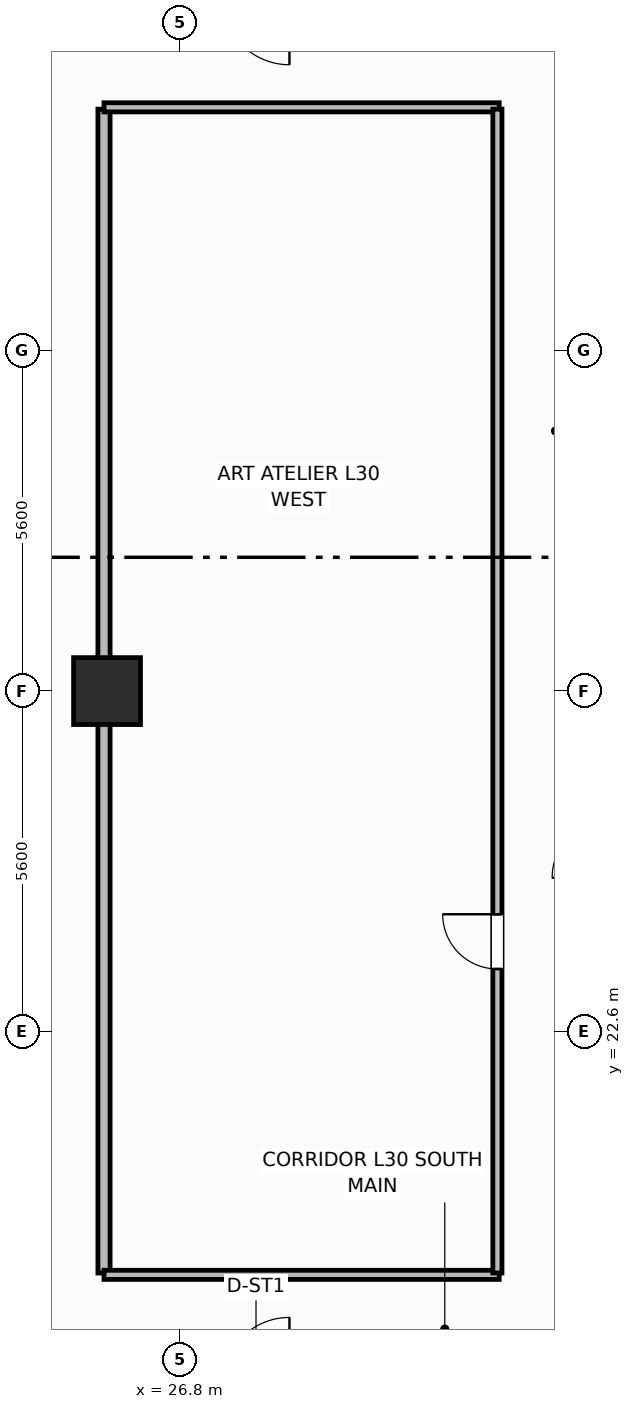
"""IFC4 building model, lengths in metres.
Left out: names, types, materials, properties, quantities, classifications, styles, units other than length and angle.
Written with IfcOpenShell. Run it as: python <this file> out.ifc"""

import sys

from ifc_helpers import new_model, si_unit, direction, frame, frame_2d, origin, origin_2d, place, context, subcontext, project, spatial, rectangle, extrude, element, fill, save


model = new_model("IFC4")
c1 = context("Model", 3, precision=1e-05, world=origin(), true_north=direction((0.0, 1.0)))
c2 = subcontext(c1, "Body", "Model", "MODEL_VIEW")
j1 = project(units=[si_unit("LENGTHUNIT", "METRE"), si_unit("PLANEANGLEUNIT", "RADIAN")], contexts=[c1])
p1 = place(None, origin())
s1 = spatial("IfcSite", under=j1, at=p1, CompositionType="ELEMENT")
p2 = place(p1, origin())
s2 = spatial("IfcBuilding", under=s1, at=p2, CompositionType="ELEMENT")
p3 = place(p2, frame((0.0, 0.0, 121.6)))
s3 = spatial("IfcBuildingStorey", under=s2, at=p3, CompositionType="ELEMENT", Elevation=121.6)
p4 = place(p3, frame((25.6, 28.2, 0.0), z_axis=(0.0, 0.0, 1.0), x_axis=(1.0, 0.0, 0.0)))
e1 = element("IfcColumn", 1, at=p4, inside=s3, PredefinedType="COLUMN", context=c2, shape_type="SweptSolid", body=[
    extrude(rectangle(XDim=1.1, YDim=1.1, at=origin_2d()), origin(), (0.0, 0.0, 1.0), 3.7),
])
p5 = place(p3, frame((25.55, 18.63, 0.0), z_axis=(0.0, 0.0, 1.0), x_axis=(0.0, 1.0, 0.0)))
e2 = element("IfcWall", 2, at=p5, inside=s3, PredefinedType="PARTITIONING", context=c2, shape_type="SweptSolid", body=[
    extrude(rectangle(XDim=19.14, YDim=0.2, at=frame_2d((9.57, 0.0))), origin(), (0.0, 0.0, 1.0), 2.53),
])
for number, where, z_axis, x_axis in (
    (3, (25.55, 18.6, 0.0), (0.0, 0.0, 1.0), (1.0, 0.0, 0.0)),
    (4, (25.55, 37.8, 0.0), (0.0, 0.0, 1.0), (1.0, 0.0, 0.0)),
):
    element("IfcWall", number, at=place(p3, frame(where, z_axis=z_axis, x_axis=x_axis)), inside=s3, PredefinedType="PARTITIONING", context=c2, shape_type="SweptSolid", body=[
        extrude(rectangle(XDim=6.5, YDim=0.15, at=frame_2d((3.25, 0.0))), origin(), (0.0, 0.0, 1.0), 2.53),
    ])
p6 = place(p3, frame((32.02, 18.63, 0.0), z_axis=(0.0, 0.0, 1.0), x_axis=(0.0, 1.0, 0.0)))
e5 = element("IfcWall", 5, at=p6, inside=s3, PredefinedType="PARTITIONING", context=c2, shape_type="SweptSolid", body=[
    extrude(rectangle(XDim=19.14, YDim=0.15, at=frame_2d((9.57, 0.0))), origin(), (0.0, 0.0, 1.0), 2.53),
])
p7 = place(p6, frame((5.0, 0.0, 0.0)))
e6 = element("IfcOpeningElement", 6, at=p7, cuts=e5, PredefinedType="OPENING", context=c2, shape_type="SweptSolid", body=[
    extrude(rectangle(XDim=0.9, YDim=2.1, at=frame_2d((0.45, 1.05))), frame((0.0, 0.085, 0.0), z_axis=(0.0, -1.0, 0.0), x_axis=(1.0, 0.0, 0.0)), (0.0, 0.0, 1.0), 0.17),
])
p8 = place(p7, origin())
e7 = element("IfcDoor", 7, at=p8, inside=s3, OperationType="SINGLE_SWING_RIGHT", PredefinedType="DOOR", context=c2, shape_type="SweptSolid", body=[
    extrude(rectangle(XDim=0.9, YDim=2.1, at=frame_2d((0.45, 1.05))), frame((0.0, 0.025, 0.0), z_axis=(0.0, -1.0, 0.0), x_axis=(1.0, 0.0, 0.0)), (0.0, 0.0, 1.0), 0.05),
])
fill(e6, e7)
save(model, sys.argv[1])
